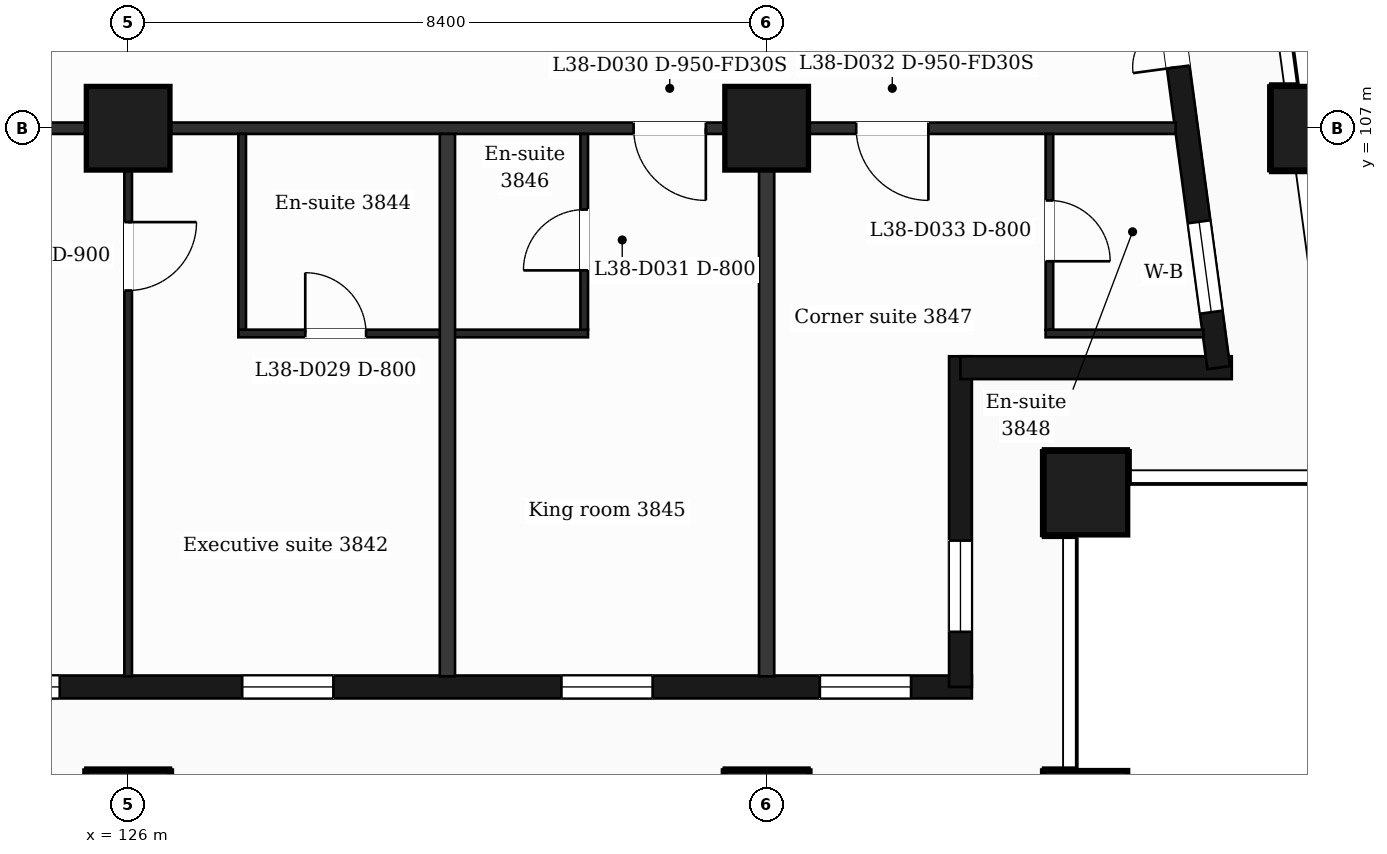
"""IFC4 building model, lengths in metres.
Left out: names, types, materials, properties, quantities, classifications, styles, units other than length and angle.
Written with IfcOpenShell. Run it as: python <this file> out.ifc"""

import sys

from ifc_helpers import new_model, si_unit, direction, frame, frame_2d, origin, origin_2d, place, context, subcontext, project, spatial, rectangle, extrude, element, fill, save


model = new_model("IFC4")
c1 = context("Model", 3, precision=1e-05, world=origin(), true_north=direction((0.0, 1.0)))
c2 = subcontext(c1, "Body", "Model", "MODEL_VIEW")
j1 = project(units=[si_unit("LENGTHUNIT", "METRE"), si_unit("PLANEANGLEUNIT", "RADIAN")], contexts=[c1])
p1 = place(None, origin())
s1 = spatial("IfcSite", under=j1, at=p1, CompositionType="ELEMENT")
p2 = place(p1, origin())
s2 = spatial("IfcBuilding", under=s1, at=p2, CompositionType="ELEMENT")
p3 = place(p2, frame((0.0, 0.0, 162.6)))
s3 = spatial("IfcBuildingStorey", under=s2, at=p3, CompositionType="ELEMENT", Elevation=162.6)
for number, where, z_axis, x_axis in (
    (1, (126.0, 98.0, 0.0), (0.0, 0.0, 1.0), (1.0, 0.0, 0.0)),
    (2, (134.4, 98.0, 0.0), (0.0, 0.0, 1.0), (1.0, 0.0, 0.0)),
    (3, (138.6, 98.0, 0.0), (0.0, 0.0, 1.0), (1.0, 0.0, 0.0)),
    (4, (138.6, 102.2, 0.0), (0.0, 0.0, 1.0), (1.0, 0.0, 0.0)),
    (5, (126.0, 107.0, 0.0), (0.0, 0.0, 1.0), (1.0, 0.0, 0.0)),
    (6, (134.4, 107.0, 0.0), (0.0, 0.0, 1.0), (1.0, 0.0, 0.0)),
    (7, (141.588, 107.0, 0.0), (0.0, 0.0, 1.0), (1.0, 0.0, 0.0)),
):
    element("IfcColumn", number, at=place(p3, frame(where, z_axis=z_axis, x_axis=x_axis)), inside=s3, PredefinedType="COLUMN", context=c2, shape_type="SweptSolid", body=[
        extrude(rectangle(XDim=1.1, YDim=1.1, at=origin_2d()), origin(), (0.0, 0.0, 1.0), 3.7),
    ])
p4 = place(p3, frame((89.85, 99.65, 0.0), z_axis=(0.0, 0.0, 1.0), x_axis=(1.0, 0.0, 0.0)))
e8 = element("IfcWall", 8, at=p4, inside=s3, PredefinedType="SOLIDWALL", context=c2, shape_type="SweptSolid", body=[
    extrude(rectangle(XDim=47.25, YDim=0.3, at=frame_2d((23.625, 0.0))), origin(), (0.0, 0.0, 1.0), 3.38),
])
p5 = place(p4, frame((0.725, 0.0, 0.9)))
e9 = element("IfcOpeningElement", 9, at=p5, cuts=e8, PredefinedType="OPENING", context=c2, shape_type="SweptSolid", body=[
    extrude(rectangle(XDim=1.2, YDim=2.1, at=frame_2d((0.6, 1.05))), frame((0.0, 0.16, 0.0), z_axis=(0.0, -1.0, 0.0), x_axis=(1.0, 0.0, 0.0)), (0.0, 0.0, 1.0), 0.32),
])
p6 = place(p4, frame((3.45, 0.0, 0.9)))
e10 = element("IfcOpeningElement", 10, at=p6, cuts=e8, PredefinedType="OPENING", context=c2, shape_type="SweptSolid", body=[
    extrude(rectangle(XDim=2.4, YDim=2.1, at=frame_2d((1.2, 1.05))), frame((0.0, 0.16, 0.0), z_axis=(0.0, -1.0, 0.0), x_axis=(1.0, 0.0, 0.0)), (0.0, 0.0, 1.0), 0.32),
])
p7 = place(p4, frame((8.25, 0.0, 0.9)))
e11 = element("IfcOpeningElement", 11, at=p7, cuts=e8, PredefinedType="OPENING", context=c2, shape_type="SweptSolid", body=[
    extrude(rectangle(XDim=1.2, YDim=2.1, at=frame_2d((0.6, 1.05))), frame((0.0, 0.16, 0.0), z_axis=(0.0, -1.0, 0.0), x_axis=(1.0, 0.0, 0.0)), (0.0, 0.0, 1.0), 0.32),
])
p8 = place(p4, frame((12.45, 0.0, 0.9)))
e12 = element("IfcOpeningElement", 12, at=p8, cuts=e8, PredefinedType="OPENING", context=c2, shape_type="SweptSolid", body=[
    extrude(rectangle(XDim=1.2, YDim=2.1, at=frame_2d((0.6, 1.05))), frame((0.0, 0.16, 0.0), z_axis=(0.0, -1.0, 0.0), x_axis=(1.0, 0.0, 0.0)), (0.0, 0.0, 1.0), 0.32),
])
p9 = place(p4, frame((16.05, 0.0, 0.9)))
e13 = element("IfcOpeningElement", 13, at=p9, cuts=e8, PredefinedType="OPENING", context=c2, shape_type="SweptSolid", body=[
    extrude(rectangle(XDim=2.4, YDim=2.1, at=frame_2d((1.2, 1.05))), frame((0.0, 0.16, 0.0), z_axis=(0.0, -1.0, 0.0), x_axis=(1.0, 0.0, 0.0)), (0.0, 0.0, 1.0), 0.32),
])
p10 = place(p4, frame((20.25, 0.0, 0.9)))
e14 = element("IfcOpeningElement", 14, at=p10, cuts=e8, PredefinedType="OPENING", context=c2, shape_type="SweptSolid", body=[
    extrude(rectangle(XDim=2.4, YDim=2.1, at=frame_2d((1.2, 1.05))), frame((0.0, 0.16, 0.0), z_axis=(0.0, -1.0, 0.0), x_axis=(1.0, 0.0, 0.0)), (0.0, 0.0, 1.0), 0.32),
])
p11 = place(p4, frame((25.05, 0.0, 0.0)))
e15 = element("IfcOpeningElement", 15, at=p11, cuts=e8, PredefinedType="OPENING", context=c2, shape_type="SweptSolid", body=[
    extrude(rectangle(XDim=1.2, YDim=2.4, at=frame_2d((0.6, 1.2))), frame((0.0, 0.16, 0.0), z_axis=(0.0, -1.0, 0.0), x_axis=(1.0, 0.0, 0.0)), (0.0, 0.0, 1.0), 0.32),
])
p12 = place(p4, frame((28.65, 0.0, 0.9)))
e16 = element("IfcOpeningElement", 16, at=p12, cuts=e8, PredefinedType="OPENING", context=c2, shape_type="SweptSolid", body=[
    extrude(rectangle(XDim=2.4, YDim=2.1, at=frame_2d((1.2, 1.05))), frame((0.0, 0.16, 0.0), z_axis=(0.0, -1.0, 0.0), x_axis=(1.0, 0.0, 0.0)), (0.0, 0.0, 1.0), 0.32),
])
p13 = place(p4, frame((32.85, 0.0, 0.9)))
e17 = element("IfcOpeningElement", 17, at=p13, cuts=e8, PredefinedType="OPENING", context=c2, shape_type="SweptSolid", body=[
    extrude(rectangle(XDim=2.4, YDim=2.1, at=frame_2d((1.2, 1.05))), frame((0.0, 0.16, 0.0), z_axis=(0.0, -1.0, 0.0), x_axis=(1.0, 0.0, 0.0)), (0.0, 0.0, 1.0), 0.32),
])
p14 = place(p4, frame((37.65, 0.0, 0.9)))
e18 = element("IfcOpeningElement", 18, at=p14, cuts=e8, PredefinedType="OPENING", context=c2, shape_type="SweptSolid", body=[
    extrude(rectangle(XDim=1.2, YDim=2.1, at=frame_2d((0.6, 1.05))), frame((0.0, 0.16, 0.0), z_axis=(0.0, -1.0, 0.0), x_axis=(1.0, 0.0, 0.0)), (0.0, 0.0, 1.0), 0.32),
])
p15 = place(p4, frame((41.85, 0.0, 0.9)))
e19 = element("IfcOpeningElement", 19, at=p15, cuts=e8, PredefinedType="OPENING", context=c2, shape_type="SweptSolid", body=[
    extrude(rectangle(XDim=1.2, YDim=2.1, at=frame_2d((0.6, 1.05))), frame((0.0, 0.16, 0.0), z_axis=(0.0, -1.0, 0.0), x_axis=(1.0, 0.0, 0.0)), (0.0, 0.0, 1.0), 0.32),
])
p16 = place(p4, frame((45.25, 0.0, 0.9)))
e20 = element("IfcOpeningElement", 20, at=p16, cuts=e8, PredefinedType="OPENING", context=c2, shape_type="SweptSolid", body=[
    extrude(rectangle(XDim=1.2, YDim=2.1, at=frame_2d((0.6, 1.05))), frame((0.0, 0.16, 0.0), z_axis=(0.0, -1.0, 0.0), x_axis=(1.0, 0.0, 0.0)), (0.0, 0.0, 1.0), 0.32),
])
p17 = place(p3, frame((136.95, 99.65, 0.0), z_axis=(0.0, 0.0, 1.0), x_axis=(0.0, 1.0, 0.0)))
e21 = element("IfcWall", 21, at=p17, inside=s3, PredefinedType="SOLIDWALL", context=c2, shape_type="SweptSolid", body=[
    extrude(rectangle(XDim=4.35, YDim=0.3, at=frame_2d((2.175, 0.0))), origin(), (0.0, 0.0, 1.0), 3.38),
])
p18 = place(p17, frame((0.725, 0.0, 0.9)))
e22 = element("IfcOpeningElement", 22, at=p18, cuts=e21, PredefinedType="OPENING", context=c2, shape_type="SweptSolid", body=[
    extrude(rectangle(XDim=1.2, YDim=2.1, at=frame_2d((0.6, 1.05))), frame((0.0, 0.16, 0.0), z_axis=(0.0, -1.0, 0.0), x_axis=(1.0, 0.0, 0.0)), (0.0, 0.0, 1.0), 0.32),
])
p19 = place(p3, frame((136.95, 103.85, 0.0), z_axis=(0.0, 0.0, 1.0), x_axis=(1.0, 0.0, 0.0)))
e23 = element("IfcWall", 23, at=p19, inside=s3, PredefinedType="SOLIDWALL", context=c2, shape_type="SweptSolid", body=[
    extrude(rectangle(XDim=3.569, YDim=0.3, at=frame_2d((1.785, 0.0))), origin(), (0.0, 0.0, 1.0), 3.38),
])
p20 = place(p3, frame((140.348, 103.85, 0.0), z_axis=(0.0, 0.0, 1.0), x_axis=(-0.133431549479, 0.991058031401, 0.0)))
e24 = element("IfcWall", 24, at=p20, inside=s3, PredefinedType="SOLIDWALL", context=c2, shape_type="SweptSolid", body=[
    extrude(rectangle(XDim=6.609, YDim=0.3, at=frame_2d((3.304, 0.0))), origin(), (0.0, 0.0, 1.0), 3.38),
])
p21 = place(p20, frame((0.737, 0.0, 0.9)))
e25 = element("IfcOpeningElement", 25, at=p21, cuts=e24, PredefinedType="OPENING", context=c2, shape_type="SweptSolid", body=[
    extrude(rectangle(XDim=1.2, YDim=2.1, at=frame_2d((0.6, 1.05))), frame((0.0, 0.16, 0.0), z_axis=(0.0, -1.0, 0.0), x_axis=(1.0, 0.0, 0.0)), (0.0, 0.0, 1.0), 0.32),
])
p22 = place(p20, frame((3.991, 0.0, 0.0)))
e26 = element("IfcOpeningElement", 26, at=p22, cuts=e24, PredefinedType="OPENING", context=c2, shape_type="SweptSolid", body=[
    extrude(rectangle(XDim=1.2, YDim=2.4, at=frame_2d((0.6, 1.2))), frame((0.0, 0.16, 0.0), z_axis=(0.0, -1.0, 0.0), x_axis=(1.0, 0.0, 0.0)), (0.0, 0.0, 1.0), 0.32),
])
p23 = place(p3, frame((127.45, 104.3, 0.0), z_axis=(0.0, 0.0, 1.0), x_axis=(1.0, 0.0, 0.0)))
e27 = element("IfcWall", 27, at=p23, inside=s3, PredefinedType="PARTITIONING", context=c2, shape_type="SweptSolid", body=[
    extrude(rectangle(XDim=4.6, YDim=0.1, at=frame_2d((2.3, 0.0))), origin(), (0.0, 0.0, 1.0), 3.38),
])
p24 = place(p23, frame((0.88, 0.0, 0.0)))
e28 = element("IfcOpeningElement", 28, at=p24, cuts=e27, PredefinedType="OPENING", context=c2, shape_type="SweptSolid", body=[
    extrude(rectangle(XDim=0.8, YDim=2.1, at=frame_2d((0.4, 1.05))), frame((0.0, 0.06, 0.0), z_axis=(0.0, -1.0, 0.0), x_axis=(1.0, 0.0, 0.0)), (0.0, 0.0, 1.0), 0.12),
])
p25 = place(p3, frame((138.07, 104.3, 0.0), z_axis=(0.0, 0.0, 1.0), x_axis=(1.0, 0.0, 0.0)))
e29 = element("IfcWall", 29, at=p25, inside=s3, PredefinedType="PARTITIONING", context=c2, shape_type="SweptSolid", body=[
    extrude(rectangle(XDim=2.076, YDim=0.1, at=frame_2d((1.038, 0.0))), origin(), (0.0, 0.0, 1.0), 3.38),
])
p26 = place(p3, frame((87.018, 107.0, 0.0), z_axis=(0.0, 0.0, 1.0), x_axis=(1.0, 0.0, 0.0)))
e30 = element("IfcWall", 30, at=p26, inside=s3, PredefinedType="PARTITIONING", context=c2, shape_type="SweptSolid", body=[
    extrude(rectangle(XDim=52.765, YDim=0.15, at=frame_2d((26.382, 0.0))), origin(), (0.0, 0.0, 1.0), 3.38),
])
p27 = place(p26, frame((1.032, 0.0, 0.0)))
e31 = element("IfcOpeningElement", 31, at=p27, cuts=e30, PredefinedType="OPENING", context=c2, shape_type="SweptSolid", body=[
    extrude(rectangle(XDim=0.95, YDim=2.1, at=frame_2d((0.475, 1.05))), frame((0.0, 0.085, 0.0), z_axis=(0.0, -1.0, 0.0), x_axis=(1.0, 0.0, 0.0)), (0.0, 0.0, 1.0), 0.17),
])
p28 = place(p26, frame((6.369, 0.0, 0.0)))
e32 = element("IfcOpeningElement", 32, at=p28, cuts=e30, PredefinedType="OPENING", context=c2, shape_type="SweptSolid", body=[
    extrude(rectangle(XDim=0.95, YDim=2.1, at=frame_2d((0.475, 1.05))), frame((0.0, 0.085, 0.0), z_axis=(0.0, -1.0, 0.0), x_axis=(1.0, 0.0, 0.0)), (0.0, 0.0, 1.0), 0.17),
])
p29 = place(p26, frame((16.812, 0.0, 0.0)))
e33 = element("IfcOpeningElement", 33, at=p29, cuts=e30, PredefinedType="OPENING", context=c2, shape_type="SweptSolid", body=[
    extrude(rectangle(XDim=1.0, YDim=2.1, at=frame_2d((0.5, 1.05))), frame((0.0, 0.085, 0.0), z_axis=(0.0, -1.0, 0.0), x_axis=(1.0, 0.0, 0.0)), (0.0, 0.0, 1.0), 0.17),
])
p30 = place(p26, frame((25.157, 0.0, 0.0)))
e34 = element("IfcOpeningElement", 34, at=p30, cuts=e30, PredefinedType="OPENING", context=c2, shape_type="SweptSolid", body=[
    extrude(rectangle(XDim=0.95, YDim=2.1, at=frame_2d((0.475, 1.05))), frame((0.0, 0.085, 0.0), z_axis=(0.0, -1.0, 0.0), x_axis=(1.0, 0.0, 0.0)), (0.0, 0.0, 1.0), 0.17),
])
p31 = place(p26, frame((28.867, 0.0, 0.0)))
e35 = element("IfcOpeningElement", 35, at=p31, cuts=e30, PredefinedType="OPENING", context=c2, shape_type="SweptSolid", body=[
    extrude(rectangle(XDim=0.95, YDim=2.1, at=frame_2d((0.475, 1.05))), frame((0.0, 0.085, 0.0), z_axis=(0.0, -1.0, 0.0), x_axis=(1.0, 0.0, 0.0)), (0.0, 0.0, 1.0), 0.17),
])
p32 = place(p26, frame((34.952, 0.0, 0.0)))
e36 = element("IfcOpeningElement", 36, at=p32, cuts=e30, PredefinedType="OPENING", context=c2, shape_type="SweptSolid", body=[
    extrude(rectangle(XDim=1.0, YDim=2.1, at=frame_2d((0.5, 1.05))), frame((0.0, 0.085, 0.0), z_axis=(0.0, -1.0, 0.0), x_axis=(1.0, 0.0, 0.0)), (0.0, 0.0, 1.0), 0.17),
])
p33 = place(p26, frame((45.632, 0.0, 0.0)))
e37 = element("IfcOpeningElement", 37, at=p33, cuts=e30, PredefinedType="OPENING", context=c2, shape_type="SweptSolid", body=[
    extrude(rectangle(XDim=0.95, YDim=2.1, at=frame_2d((0.475, 1.05))), frame((0.0, 0.085, 0.0), z_axis=(0.0, -1.0, 0.0), x_axis=(1.0, 0.0, 0.0)), (0.0, 0.0, 1.0), 0.17),
])
p34 = place(p26, frame((48.56, 0.0, 0.0)))
e38 = element("IfcOpeningElement", 38, at=p34, cuts=e30, PredefinedType="OPENING", context=c2, shape_type="SweptSolid", body=[
    extrude(rectangle(XDim=0.95, YDim=2.1, at=frame_2d((0.475, 1.05))), frame((0.0, 0.085, 0.0), z_axis=(0.0, -1.0, 0.0), x_axis=(1.0, 0.0, 0.0)), (0.0, 0.0, 1.0), 0.17),
])
p35 = place(p3, frame((126.0, 99.79, 0.0), z_axis=(0.0, 0.0, 1.0), x_axis=(0.0, 1.0, 0.0)))
e39 = element("IfcWall", 39, at=p35, inside=s3, PredefinedType="PARTITIONING", context=c2, shape_type="SweptSolid", body=[
    extrude(rectangle(XDim=7.135, YDim=0.1, at=frame_2d((3.567, 0.0))), origin(), (0.0, 0.0, 1.0), 3.38),
])
p36 = place(p35, frame((5.075, 0.0, 0.0)))
e40 = element("IfcOpeningElement", 40, at=p36, cuts=e39, PredefinedType="OPENING", context=c2, shape_type="SweptSolid", body=[
    extrude(rectangle(XDim=0.9, YDim=2.1, at=frame_2d((0.45, 1.05))), frame((0.0, 0.06, 0.0), z_axis=(0.0, -1.0, 0.0), x_axis=(1.0, 0.0, 0.0)), (0.0, 0.0, 1.0), 0.12),
])
p37 = place(p3, frame((127.5, 104.35, 0.0), z_axis=(0.0, 0.0, 1.0), x_axis=(0.0, 1.0, 0.0)))
e41 = element("IfcWall", 41, at=p37, inside=s3, PredefinedType="PARTITIONING", context=c2, shape_type="SweptSolid", body=[
    extrude(rectangle(XDim=2.575, YDim=0.1, at=frame_2d((1.288, 0.0))), origin(), (0.0, 0.0, 1.0), 3.38),
])
p38 = place(p3, frame((130.2, 99.79, 0.0), z_axis=(0.0, 0.0, 1.0), x_axis=(0.0, 1.0, 0.0)))
e42 = element("IfcWall", 42, at=p38, inside=s3, PredefinedType="PARTITIONING", context=c2, shape_type="SweptSolid", body=[
    extrude(rectangle(XDim=7.135, YDim=0.2, at=frame_2d((3.567, 0.0))), origin(), (0.0, 0.0, 1.0), 3.38),
])
p39 = place(p3, frame((132.0, 104.35, 0.0), z_axis=(0.0, 0.0, 1.0), x_axis=(0.0, 1.0, 0.0)))
e43 = element("IfcWall", 43, at=p39, inside=s3, PredefinedType="PARTITIONING", context=c2, shape_type="SweptSolid", body=[
    extrude(rectangle(XDim=2.575, YDim=0.1, at=frame_2d((1.288, 0.0))), origin(), (0.0, 0.0, 1.0), 3.38),
])
p40 = place(p39, frame((0.78, 0.0, 0.0)))
e44 = element("IfcOpeningElement", 44, at=p40, cuts=e43, PredefinedType="OPENING", context=c2, shape_type="SweptSolid", body=[
    extrude(rectangle(XDim=0.8, YDim=2.1, at=frame_2d((0.4, 1.05))), frame((0.0, 0.06, 0.0), z_axis=(0.0, -1.0, 0.0), x_axis=(1.0, 0.0, 0.0)), (0.0, 0.0, 1.0), 0.12),
])
p41 = place(p3, frame((134.4, 99.79, 0.0), z_axis=(0.0, 0.0, 1.0), x_axis=(0.0, 1.0, 0.0)))
e45 = element("IfcWall", 45, at=p41, inside=s3, PredefinedType="PARTITIONING", context=c2, shape_type="SweptSolid", body=[
    extrude(rectangle(XDim=7.135, YDim=0.2, at=frame_2d((3.567, 0.0))), origin(), (0.0, 0.0, 1.0), 3.38),
])
p42 = place(p3, frame((138.12, 104.35, 0.0), z_axis=(0.0, 0.0, 1.0), x_axis=(0.0, 1.0, 0.0)))
e46 = element("IfcWall", 46, at=p42, inside=s3, PredefinedType="PARTITIONING", context=c2, shape_type="SweptSolid", body=[
    extrude(rectangle(XDim=2.575, YDim=0.1, at=frame_2d((1.288, 0.0))), origin(), (0.0, 0.0, 1.0), 3.38),
])
p43 = place(p42, frame((0.9, 0.0, 0.0)))
e47 = element("IfcOpeningElement", 47, at=p43, cuts=e46, PredefinedType="OPENING", context=c2, shape_type="SweptSolid", body=[
    extrude(rectangle(XDim=0.8, YDim=2.1, at=frame_2d((0.4, 1.05))), frame((0.0, 0.06, 0.0), z_axis=(0.0, -1.0, 0.0), x_axis=(1.0, 0.0, 0.0)), (0.0, 0.0, 1.0), 0.12),
])
p44 = place(p13, origin())
e48 = element("IfcWindow", 48, at=p44, inside=s3, PartitioningType="SINGLE_PANEL", PredefinedType="WINDOW", context=c2, shape_type="SweptSolid", body=[
    extrude(rectangle(XDim=2.4, YDim=2.1, at=frame_2d((1.2, 1.05))), frame((0.0, 0.03, 0.0), z_axis=(0.0, -1.0, 0.0), x_axis=(1.0, 0.0, 0.0)), (0.0, 0.0, 1.0), 0.06),
])
fill(e17, e48)
p45 = place(p14, origin())
e49 = element("IfcWindow", 49, at=p45, inside=s3, PartitioningType="SINGLE_PANEL", PredefinedType="WINDOW", context=c2, shape_type="SweptSolid", body=[
    extrude(rectangle(XDim=1.2, YDim=2.1, at=frame_2d((0.6, 1.05))), frame((0.0, 0.03, 0.0), z_axis=(0.0, -1.0, 0.0), x_axis=(1.0, 0.0, 0.0)), (0.0, 0.0, 1.0), 0.06),
])
fill(e18, e49)
p46 = place(p15, origin())
e50 = element("IfcWindow", 50, at=p46, inside=s3, PartitioningType="SINGLE_PANEL", PredefinedType="WINDOW", context=c2, shape_type="SweptSolid", body=[
    extrude(rectangle(XDim=1.2, YDim=2.1, at=frame_2d((0.6, 1.05))), frame((0.0, 0.03, 0.0), z_axis=(0.0, -1.0, 0.0), x_axis=(1.0, 0.0, 0.0)), (0.0, 0.0, 1.0), 0.06),
])
fill(e19, e50)
p47 = place(p16, origin())
e51 = element("IfcWindow", 51, at=p47, inside=s3, PartitioningType="SINGLE_PANEL", PredefinedType="WINDOW", context=c2, shape_type="SweptSolid", body=[
    extrude(rectangle(XDim=1.2, YDim=2.1, at=frame_2d((0.6, 1.05))), frame((0.0, 0.03, 0.0), z_axis=(0.0, -1.0, 0.0), x_axis=(1.0, 0.0, 0.0)), (0.0, 0.0, 1.0), 0.06),
])
fill(e20, e51)
p48 = place(p18, origin())
e52 = element("IfcWindow", 52, at=p48, inside=s3, PartitioningType="SINGLE_PANEL", PredefinedType="WINDOW", context=c2, shape_type="SweptSolid", body=[
    extrude(rectangle(XDim=1.2, YDim=2.1, at=frame_2d((0.6, 1.05))), frame((0.0, 0.03, 0.0), z_axis=(0.0, -1.0, 0.0), x_axis=(1.0, 0.0, 0.0)), (0.0, 0.0, 1.0), 0.06),
])
fill(e22, e52)
p49 = place(p21, origin())
e53 = element("IfcWindow", 53, at=p49, inside=s3, PartitioningType="SINGLE_PANEL", PredefinedType="WINDOW", context=c2, shape_type="SweptSolid", body=[
    extrude(rectangle(XDim=1.2, YDim=2.1, at=frame_2d((0.6, 1.05))), frame((0.0, 0.03, 0.0), z_axis=(0.0, -1.0, 0.0), x_axis=(1.0, 0.0, 0.0)), (0.0, 0.0, 1.0), 0.06),
])
fill(e25, e53)
p50 = place(p22, origin())
e54 = element("IfcDoor", 54, at=p50, inside=s3, OperationType="DOUBLE_DOOR_SINGLE_SWING", PredefinedType="DOOR", context=c2, shape_type="SweptSolid", body=[
    extrude(rectangle(XDim=1.2, YDim=2.4, at=frame_2d((0.6, 1.2))), frame((0.0, 0.025, 0.0), z_axis=(0.0, -1.0, 0.0), x_axis=(1.0, 0.0, 0.0)), (0.0, 0.0, 1.0), 0.05),
])
fill(e26, e54)
p51 = place(p36, origin())
e55 = element("IfcDoor", 55, at=p51, inside=s3, OperationType="SINGLE_SWING_RIGHT", PredefinedType="DOOR", context=c2, shape_type="SweptSolid", body=[
    extrude(rectangle(XDim=0.9, YDim=2.1, at=frame_2d((0.45, 1.05))), frame((0.0, 0.025, 0.0), z_axis=(0.0, -1.0, 0.0), x_axis=(1.0, 0.0, 0.0)), (0.0, 0.0, 1.0), 0.05),
])
fill(e40, e55)
p52 = place(p24, origin())
e56 = element("IfcDoor", 56, at=p52, inside=s3, OperationType="SINGLE_SWING_LEFT", PredefinedType="DOOR", context=c2, shape_type="SweptSolid", body=[
    extrude(rectangle(XDim=0.8, YDim=2.1, at=frame_2d((0.4, 1.05))), frame((0.0, 0.025, 0.0), z_axis=(0.0, -1.0, 0.0), x_axis=(1.0, 0.0, 0.0)), (0.0, 0.0, 1.0), 0.05),
])
fill(e28, e56)
p53 = place(p33, origin())
e57 = element("IfcDoor", 57, at=p53, inside=s3, OperationType="SINGLE_SWING_RIGHT", PredefinedType="DOOR", context=c2, shape_type="SweptSolid", body=[
    extrude(rectangle(XDim=0.95, YDim=2.1, at=frame_2d((0.475, 1.05))), frame((0.0, 0.025, 0.0), z_axis=(0.0, -1.0, 0.0), x_axis=(1.0, 0.0, 0.0)), (0.0, 0.0, 1.0), 0.05),
])
fill(e37, e57)
p54 = place(p40, origin())
e58 = element("IfcDoor", 58, at=p54, inside=s3, OperationType="SINGLE_SWING_LEFT", PredefinedType="DOOR", context=c2, shape_type="SweptSolid", body=[
    extrude(rectangle(XDim=0.8, YDim=2.1, at=frame_2d((0.4, 1.05))), frame((0.0, 0.025, 0.0), z_axis=(0.0, -1.0, 0.0), x_axis=(1.0, 0.0, 0.0)), (0.0, 0.0, 1.0), 0.05),
])
fill(e44, e58)
p55 = place(p34, origin())
e59 = element("IfcDoor", 59, at=p55, inside=s3, OperationType="SINGLE_SWING_RIGHT", PredefinedType="DOOR", context=c2, shape_type="SweptSolid", body=[
    extrude(rectangle(XDim=0.95, YDim=2.1, at=frame_2d((0.475, 1.05))), frame((0.0, 0.025, 0.0), z_axis=(0.0, -1.0, 0.0), x_axis=(1.0, 0.0, 0.0)), (0.0, 0.0, 1.0), 0.05),
])
fill(e38, e59)
p56 = place(p43, origin())
e60 = element("IfcDoor", 60, at=p56, inside=s3, OperationType="SINGLE_SWING_LEFT", PredefinedType="DOOR", context=c2, shape_type="SweptSolid", body=[
    extrude(rectangle(XDim=0.8, YDim=2.1, at=frame_2d((0.4, 1.05))), frame((0.0, 0.025, 0.0), z_axis=(0.0, -1.0, 0.0), x_axis=(1.0, 0.0, 0.0)), (0.0, 0.0, 1.0), 0.05),
])
fill(e47, e60)
save(model, sys.argv[1])
